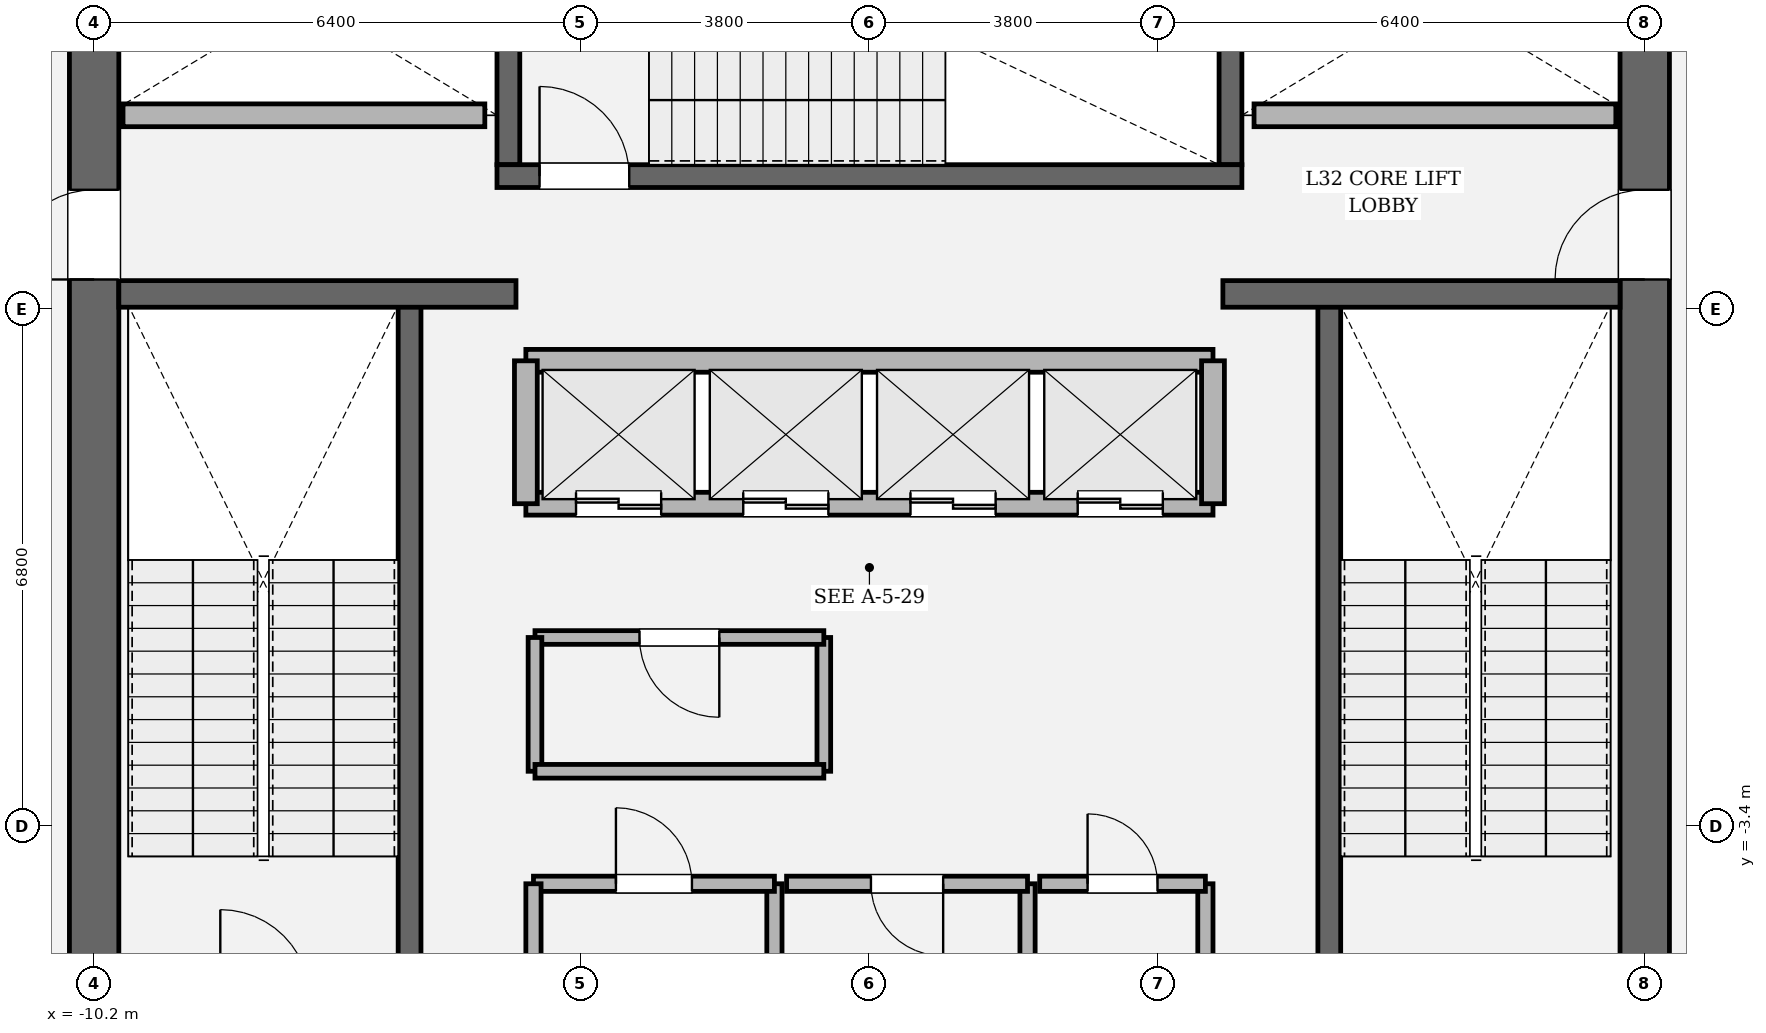
"""IFC4 building model, lengths in metres.
Left out: names, types, materials, properties, quantities, classifications, styles, units other than length and angle.
Written with IfcOpenShell. Run it as: python <this file> out.ifc"""

import sys

from ifc_helpers import new_model, si_unit, direction, frame, frame_2d, origin, place, context, subcontext, project, spatial, rectangle, extrude, element, fill, save


model = new_model("IFC4")
c1 = context("Model", 3, precision=1e-05, world=origin(), true_north=direction((0.0, 1.0)))
c2 = subcontext(c1, "Body", "Model", "MODEL_VIEW")
j1 = project(units=[si_unit("LENGTHUNIT", "METRE"), si_unit("PLANEANGLEUNIT", "RADIAN")], contexts=[c1])
p1 = place(None, origin())
s1 = spatial("IfcSite", under=j1, at=p1, CompositionType="ELEMENT")
p2 = place(p1, origin())
s2 = spatial("IfcBuilding", under=s1, at=p2, CompositionType="ELEMENT")
p3 = place(p2, frame((0.0, 0.0, 139.8)))
s3 = spatial("IfcBuildingStorey", under=s2, at=p3, CompositionType="ELEMENT", Elevation=139.8)
p4 = place(p3, frame((-10.2, -8.875, 0.0), z_axis=(0.0, 0.0, 1.0), x_axis=(0.0, 1.0, 0.0)))
e1 = element("IfcWall", 1, at=p4, inside=s3, PredefinedType="SHEAR", context=c2, shape_type="SweptSolid", body=[
    extrude(rectangle(XDim=17.75, YDim=0.65, at=frame_2d((8.875, 0.0))), origin(), (0.0, 0.0, 1.0), 4.05),
])
p5 = place(p4, frame((12.665, 0.0, 0.0)))
e2 = element("IfcOpeningElement", 2, at=p5, cuts=e1, PredefinedType="OPENING", context=c2, shape_type="SweptSolid", body=[
    extrude(rectangle(XDim=1.18, YDim=2.2, at=frame_2d((0.59, 1.1))), frame((0.0, 0.335, 0.0), z_axis=(0.0, -1.0, 0.0), x_axis=(1.0, 0.0, 0.0)), (0.0, 0.0, 1.0), 0.67),
])
p6 = place(p3, frame((10.2, 8.875, 0.0), z_axis=(0.0, 0.0, 1.0), x_axis=(0.0, -1.0, 0.0)))
e3 = element("IfcWall", 3, at=p6, inside=s3, PredefinedType="SHEAR", context=c2, shape_type="SweptSolid", body=[
    extrude(rectangle(XDim=17.75, YDim=0.65, at=frame_2d((8.875, 0.0))), origin(), (0.0, 0.0, 1.0), 4.05),
])
p7 = place(p6, frame((3.905, 0.0, 0.0)))
e4 = element("IfcOpeningElement", 4, at=p7, cuts=e3, PredefinedType="OPENING", context=c2, shape_type="SweptSolid", body=[
    extrude(rectangle(XDim=1.18, YDim=2.2, at=frame_2d((0.59, 1.1))), frame((0.0, 0.335, 0.0), z_axis=(0.0, -1.0, 0.0), x_axis=(1.0, 0.0, 0.0)), (0.0, 0.0, 1.0), 0.67),
])
for number, where, z_axis, x_axis in (
    (5, (-6.05, -5.5, 0.0), (0.0, 0.0, 1.0), (0.0, 1.0, 0.0)),
    (6, (6.05, 3.45, 0.0), (0.0, 0.0, 1.0), (0.0, -1.0, 0.0)),
):
    element("IfcWall", number, at=place(p3, frame(where, z_axis=z_axis, x_axis=x_axis)), inside=s3, PredefinedType="SOLIDWALL", context=c2, shape_type="SweptSolid", body=[
        extrude(rectangle(XDim=8.95, YDim=0.3, at=frame_2d((4.475, 0.0))), origin(), (0.0, 0.0, 1.0), 4.05),
    ])
for number, where, z_axis, x_axis in (
    (7, (-4.75, 5.3, 0.0), (0.0, 0.0, 1.0), (0.0, 1.0, 0.0)),
    (8, (4.75, 8.875, 0.0), (0.0, 0.0, 1.0), (0.0, -1.0, 0.0)),
):
    element("IfcWall", number, at=place(p3, frame(where, z_axis=z_axis, x_axis=x_axis)), inside=s3, PredefinedType="SOLIDWALL", context=c2, shape_type="SweptSolid", body=[
        extrude(rectangle(XDim=3.575, YDim=0.3, at=frame_2d((1.788, 0.0))), origin(), (0.0, 0.0, 1.0), 4.05),
    ])
p8 = place(p3, frame((-4.9, 5.15, 0.0), z_axis=(0.0, 0.0, 1.0), x_axis=(1.0, 0.0, 0.0)))
e9 = element("IfcWall", 9, at=p8, inside=s3, PredefinedType="SOLIDWALL", context=c2, shape_type="SweptSolid", body=[
    extrude(rectangle(XDim=9.8, YDim=0.3, at=frame_2d((4.9, 0.0))), origin(), (0.0, 0.0, 1.0), 4.05),
])
p9 = place(p8, frame((0.56, 0.0, 0.0)))
e10 = element("IfcOpeningElement", 10, at=p9, cuts=e9, PredefinedType="OPENING", context=c2, shape_type="SweptSolid", body=[
    extrude(rectangle(XDim=1.18, YDim=2.2, at=frame_2d((0.59, 1.1))), frame((0.0, 0.16, 0.0), z_axis=(0.0, -1.0, 0.0), x_axis=(1.0, 0.0, 0.0)), (0.0, 0.0, 1.0), 0.32),
])
for number, where, z_axis, x_axis in (
    (11, (-9.875, 3.6, 0.0), (0.0, 0.0, 1.0), (1.0, 0.0, 0.0)),
    (12, (4.65, 3.6, 0.0), (0.0, 0.0, 1.0), (1.0, 0.0, 0.0)),
):
    element("IfcWall", number, at=place(p3, frame(where, z_axis=z_axis, x_axis=x_axis)), inside=s3, PredefinedType="SOLIDWALL", context=c2, shape_type="SweptSolid", body=[
        extrude(rectangle(XDim=5.225, YDim=0.35, at=frame_2d((2.613, 0.0))), origin(), (0.0, 0.0, 1.0), 4.05),
    ])
p10 = place(p3, frame((-4.52, 0.84, 0.0), z_axis=(0.0, 0.0, 1.0), x_axis=(1.0, 0.0, 0.0)))
e13 = element("IfcWall", 13, at=p10, inside=s3, PredefinedType="SOLIDWALL", context=c2, shape_type="SweptSolid", body=[
    extrude(rectangle(XDim=9.04, YDim=0.3, at=frame_2d((4.52, 0.0))), origin(), (0.0, 0.0, 1.0), 3.83),
])
p11 = place(p10, frame((0.66, 0.0, 0.0)))
e14 = element("IfcOpeningElement", 14, at=p11, cuts=e13, PredefinedType="OPENING", context=c2, shape_type="SweptSolid", body=[
    extrude(rectangle(XDim=1.12, YDim=2.25, at=frame_2d((0.56, 1.125))), frame((0.0, 0.16, 0.0), z_axis=(0.0, -1.0, 0.0), x_axis=(1.0, 0.0, 0.0)), (0.0, 0.0, 1.0), 0.32),
])
p12 = place(p10, frame((2.86, 0.0, 0.0)))
e15 = element("IfcOpeningElement", 15, at=p12, cuts=e13, PredefinedType="OPENING", context=c2, shape_type="SweptSolid", body=[
    extrude(rectangle(XDim=1.12, YDim=2.25, at=frame_2d((0.56, 1.125))), frame((0.0, 0.16, 0.0), z_axis=(0.0, -1.0, 0.0), x_axis=(1.0, 0.0, 0.0)), (0.0, 0.0, 1.0), 0.32),
])
p13 = place(p10, frame((5.06, 0.0, 0.0)))
e16 = element("IfcOpeningElement", 16, at=p13, cuts=e13, PredefinedType="OPENING", context=c2, shape_type="SweptSolid", body=[
    extrude(rectangle(XDim=1.12, YDim=2.25, at=frame_2d((0.56, 1.125))), frame((0.0, 0.16, 0.0), z_axis=(0.0, -1.0, 0.0), x_axis=(1.0, 0.0, 0.0)), (0.0, 0.0, 1.0), 0.32),
])
p14 = place(p10, frame((7.26, 0.0, 0.0)))
e17 = element("IfcOpeningElement", 17, at=p14, cuts=e13, PredefinedType="OPENING", context=c2, shape_type="SweptSolid", body=[
    extrude(rectangle(XDim=1.12, YDim=2.25, at=frame_2d((0.56, 1.125))), frame((0.0, 0.16, 0.0), z_axis=(0.0, -1.0, 0.0), x_axis=(1.0, 0.0, 0.0)), (0.0, 0.0, 1.0), 0.32),
])
p15 = place(p3, frame((-4.52, 2.72, 0.0), z_axis=(0.0, 0.0, 1.0), x_axis=(1.0, 0.0, 0.0)))
e18 = element("IfcWall", 18, at=p15, inside=s3, PredefinedType="SOLIDWALL", context=c2, shape_type="SweptSolid", body=[
    extrude(rectangle(XDim=9.04, YDim=0.3, at=frame_2d((4.52, 0.0))), origin(), (0.0, 0.0, 1.0), 3.83),
])
for number, where, z_axis, x_axis in (
    (19, (-4.52, 0.84, 0.0), (0.0, 0.0, 1.0), (0.0, 1.0, 0.0)),
    (20, (4.52, 0.84, 0.0), (0.0, 0.0, 1.0), (0.0, 1.0, 0.0)),
):
    element("IfcWall", number, at=place(p3, frame(where, z_axis=z_axis, x_axis=x_axis)), inside=s3, PredefinedType="SOLIDWALL", context=c2, shape_type="SweptSolid", body=[
        extrude(rectangle(XDim=1.88, YDim=0.3, at=frame_2d((0.94, 0.0))), origin(), (0.0, 0.0, 1.0), 3.83),
    ])
for number, where, z_axis, x_axis in (
    (21, (-9.82, 5.95, 0.0), (0.0, 0.0, 1.0), (1.0, 0.0, 0.0)),
    (22, (5.06, 5.95, 0.0), (0.0, 0.0, 1.0), (1.0, 0.0, 0.0)),
):
    element("IfcWall", number, at=place(p3, frame(where, z_axis=z_axis, x_axis=x_axis)), inside=s3, PredefinedType="SOLIDWALL", context=c2, shape_type="SweptSolid", body=[
        extrude(rectangle(XDim=4.76, YDim=0.3, at=frame_2d((2.38, 0.0))), origin(), (0.0, 0.0, 1.0), 3.83),
    ])
p16 = place(p3, frame((-1.25, -5.9, 0.0), z_axis=(0.0, 0.0, 1.0), x_axis=(0.0, 1.0, 0.0)))
e23 = element("IfcWall", 23, at=p16, inside=s3, PredefinedType="SOLIDWALL", context=c2, shape_type="SweptSolid", body=[
    extrude(rectangle(XDim=1.74, YDim=0.2, at=frame_2d((0.87, 0.0))), origin(), (0.0, 0.0, 1.0), 3.83),
])
p17 = place(p3, frame((-1.25, -4.16, 0.0), z_axis=(0.0, 0.0, 1.0), x_axis=(-1.0, 0.0, 0.0)))
e24 = element("IfcWall", 24, at=p17, inside=s3, PredefinedType="SOLIDWALL", context=c2, shape_type="SweptSolid", body=[
    extrude(rectangle(XDim=3.17, YDim=0.2, at=frame_2d((1.585, 0.0))), origin(), (0.0, 0.0, 1.0), 3.83),
])
p18 = place(p17, frame((1.085, 0.0, 0.0)))
e25 = element("IfcOpeningElement", 25, at=p18, cuts=e24, PredefinedType="OPENING", context=c2, shape_type="SweptSolid", body=[
    extrude(rectangle(XDim=1.0, YDim=2.15, at=frame_2d((0.5, 1.075))), frame((0.0, 0.11, 0.0), z_axis=(0.0, -1.0, 0.0), x_axis=(1.0, 0.0, 0.0)), (0.0, 0.0, 1.0), 0.22),
])
for number, where, z_axis, x_axis in (
    (26, (-4.42, -4.16, 0.0), (0.0, 0.0, 1.0), (0.0, -1.0, 0.0)),
    (27, (2.08, -5.9, 0.0), (0.0, 0.0, 1.0), (0.0, 1.0, 0.0)),
):
    element("IfcWall", number, at=place(p3, frame(where, z_axis=z_axis, x_axis=x_axis)), inside=s3, PredefinedType="SOLIDWALL", context=c2, shape_type="SweptSolid", body=[
        extrude(rectangle(XDim=1.74, YDim=0.2, at=frame_2d((0.87, 0.0))), origin(), (0.0, 0.0, 1.0), 3.83),
    ])
p19 = place(p3, frame((2.08, -4.16, 0.0), z_axis=(0.0, 0.0, 1.0), x_axis=(-1.0, 0.0, 0.0)))
e28 = element("IfcWall", 28, at=p19, inside=s3, PredefinedType="SOLIDWALL", context=c2, shape_type="SweptSolid", body=[
    extrude(rectangle(XDim=3.17, YDim=0.2, at=frame_2d((1.585, 0.0))), origin(), (0.0, 0.0, 1.0), 3.83),
])
p20 = place(p19, frame((1.11, 0.0, 0.0)))
e29 = element("IfcOpeningElement", 29, at=p20, cuts=e28, PredefinedType="OPENING", context=c2, shape_type="SweptSolid", body=[
    extrude(rectangle(XDim=0.95, YDim=2.15, at=frame_2d((0.475, 1.075))), frame((0.0, 0.11, 0.0), z_axis=(0.0, -1.0, 0.0), x_axis=(1.0, 0.0, 0.0)), (0.0, 0.0, 1.0), 0.22),
])
p21 = place(p3, frame((4.42, -5.9, 0.0), z_axis=(0.0, 0.0, 1.0), x_axis=(0.0, 1.0, 0.0)))
e30 = element("IfcWall", 30, at=p21, inside=s3, PredefinedType="SOLIDWALL", context=c2, shape_type="SweptSolid", body=[
    extrude(rectangle(XDim=1.74, YDim=0.2, at=frame_2d((0.87, 0.0))), origin(), (0.0, 0.0, 1.0), 3.83),
])
p22 = place(p3, frame((4.42, -4.16, 0.0), z_axis=(0.0, 0.0, 1.0), x_axis=(-1.0, 0.0, 0.0)))
e31 = element("IfcWall", 31, at=p22, inside=s3, PredefinedType="SOLIDWALL", context=c2, shape_type="SweptSolid", body=[
    extrude(rectangle(XDim=2.18, YDim=0.2, at=frame_2d((1.09, 0.0))), origin(), (0.0, 0.0, 1.0), 3.83),
])
p23 = place(p22, frame((0.63, 0.0, 0.0)))
e32 = element("IfcOpeningElement", 32, at=p23, cuts=e31, PredefinedType="OPENING", context=c2, shape_type="SweptSolid", body=[
    extrude(rectangle(XDim=0.92, YDim=2.1, at=frame_2d((0.46, 1.05))), frame((0.0, 0.11, 0.0), z_axis=(0.0, -1.0, 0.0), x_axis=(1.0, 0.0, 0.0)), (0.0, 0.0, 1.0), 0.22),
])
p24 = place(p3, frame((-0.6, -2.68, 0.0), z_axis=(0.0, 0.0, 1.0), x_axis=(0.0, 1.0, 0.0)))
e33 = element("IfcWall", 33, at=p24, inside=s3, PredefinedType="PARTITIONING", context=c2, shape_type="SweptSolid", body=[
    extrude(rectangle(XDim=1.76, YDim=0.18, at=frame_2d((0.88, 0.0))), origin(), (0.0, 0.0, 1.0), 3.83),
])
p25 = place(p3, frame((-0.6, -0.92, 0.0), z_axis=(0.0, 0.0, 1.0), x_axis=(-1.0, 0.0, 0.0)))
e34 = element("IfcWall", 34, at=p25, inside=s3, PredefinedType="PARTITIONING", context=c2, shape_type="SweptSolid", body=[
    extrude(rectangle(XDim=3.8, YDim=0.18, at=frame_2d((1.9, 0.0))), origin(), (0.0, 0.0, 1.0), 3.83),
])
p26 = place(p25, frame((1.375, 0.0, 0.0)))
e35 = element("IfcOpeningElement", 35, at=p26, cuts=e34, PredefinedType="OPENING", context=c2, shape_type="SweptSolid", body=[
    extrude(rectangle(XDim=1.05, YDim=2.2, at=frame_2d((0.525, 1.1))), frame((0.0, 0.1, 0.0), z_axis=(0.0, -1.0, 0.0), x_axis=(1.0, 0.0, 0.0)), (0.0, 0.0, 1.0), 0.2),
])
p27 = place(p3, frame((-4.4, -0.92, 0.0), z_axis=(0.0, 0.0, 1.0), x_axis=(0.0, -1.0, 0.0)))
e36 = element("IfcWall", 36, at=p27, inside=s3, PredefinedType="PARTITIONING", context=c2, shape_type="SweptSolid", body=[
    extrude(rectangle(XDim=1.76, YDim=0.18, at=frame_2d((0.88, 0.0))), origin(), (0.0, 0.0, 1.0), 3.83),
])
p28 = place(p3, frame((-4.4, -2.68, 0.0), z_axis=(0.0, 0.0, 1.0), x_axis=(1.0, 0.0, 0.0)))
e37 = element("IfcWall", 37, at=p28, inside=s3, PredefinedType="PARTITIONING", context=c2, shape_type="SweptSolid", body=[
    extrude(rectangle(XDim=3.8, YDim=0.18, at=frame_2d((1.9, 0.0))), origin(), (0.0, 0.0, 1.0), 3.83),
])
p29 = place(p9, origin())
e38 = element("IfcDoor", 38, at=p29, inside=s3, OperationType="SINGLE_SWING_LEFT", PredefinedType="DOOR", context=c2, shape_type="SweptSolid", body=[
    extrude(rectangle(XDim=1.18, YDim=2.2, at=frame_2d((0.59, 1.1))), frame((0.0, 0.025, 0.0), z_axis=(0.0, -1.0, 0.0), x_axis=(1.0, 0.0, 0.0)), (0.0, 0.0, 1.0), 0.05),
])
fill(e10, e38)
p30 = place(p5, origin())
e39 = element("IfcDoor", 39, at=p30, inside=s3, OperationType="SINGLE_SWING_LEFT", PredefinedType="DOOR", context=c2, shape_type="SweptSolid", body=[
    extrude(rectangle(XDim=1.18, YDim=2.2, at=frame_2d((0.59, 1.1))), frame((0.0, 0.025, 0.0), z_axis=(0.0, -1.0, 0.0), x_axis=(1.0, 0.0, 0.0)), (0.0, 0.0, 1.0), 0.05),
])
fill(e2, e39)
p31 = place(p7, origin())
e40 = element("IfcDoor", 40, at=p31, inside=s3, OperationType="SINGLE_SWING_RIGHT", PredefinedType="DOOR", context=c2, shape_type="SweptSolid", body=[
    extrude(rectangle(XDim=1.18, YDim=2.2, at=frame_2d((0.59, 1.1))), frame((0.0, 0.025, 0.0), z_axis=(0.0, -1.0, 0.0), x_axis=(1.0, 0.0, 0.0)), (0.0, 0.0, 1.0), 0.05),
])
fill(e4, e40)
p32 = place(p11, origin())
e41 = element("IfcDoor", 41, at=p32, inside=s3, OperationType="DOUBLE_DOOR_SLIDING", PredefinedType="DOOR", context=c2, shape_type="SweptSolid", body=[
    extrude(rectangle(XDim=1.12, YDim=2.25, at=frame_2d((0.56, 1.125))), frame((0.0, 0.025, 0.0), z_axis=(0.0, -1.0, 0.0), x_axis=(1.0, 0.0, 0.0)), (0.0, 0.0, 1.0), 0.05),
])
fill(e14, e41)
p33 = place(p12, origin())
e42 = element("IfcDoor", 42, at=p33, inside=s3, OperationType="DOUBLE_DOOR_SLIDING", PredefinedType="DOOR", context=c2, shape_type="SweptSolid", body=[
    extrude(rectangle(XDim=1.12, YDim=2.25, at=frame_2d((0.56, 1.125))), frame((0.0, 0.025, 0.0), z_axis=(0.0, -1.0, 0.0), x_axis=(1.0, 0.0, 0.0)), (0.0, 0.0, 1.0), 0.05),
])
fill(e15, e42)
p34 = place(p13, origin())
e43 = element("IfcDoor", 43, at=p34, inside=s3, OperationType="DOUBLE_DOOR_SLIDING", PredefinedType="DOOR", context=c2, shape_type="SweptSolid", body=[
    extrude(rectangle(XDim=1.12, YDim=2.25, at=frame_2d((0.56, 1.125))), frame((0.0, 0.025, 0.0), z_axis=(0.0, -1.0, 0.0), x_axis=(1.0, 0.0, 0.0)), (0.0, 0.0, 1.0), 0.05),
])
fill(e16, e43)
p35 = place(p14, origin())
e44 = element("IfcDoor", 44, at=p35, inside=s3, OperationType="DOUBLE_DOOR_SLIDING", PredefinedType="DOOR", context=c2, shape_type="SweptSolid", body=[
    extrude(rectangle(XDim=1.12, YDim=2.25, at=frame_2d((0.56, 1.125))), frame((0.0, 0.025, 0.0), z_axis=(0.0, -1.0, 0.0), x_axis=(1.0, 0.0, 0.0)), (0.0, 0.0, 1.0), 0.05),
])
fill(e17, e44)
p36 = place(p18, origin())
e45 = element("IfcDoor", 45, at=p36, inside=s3, OperationType="SINGLE_SWING_RIGHT", PredefinedType="DOOR", context=c2, shape_type="SweptSolid", body=[
    extrude(rectangle(XDim=1.0, YDim=2.15, at=frame_2d((0.5, 1.075))), frame((0.0, 0.025, 0.0), z_axis=(0.0, -1.0, 0.0), x_axis=(1.0, 0.0, 0.0)), (0.0, 0.0, 1.0), 0.05),
])
fill(e25, e45)
p37 = place(p20, origin())
e46 = element("IfcDoor", 46, at=p37, inside=s3, OperationType="SINGLE_SWING_LEFT", PredefinedType="DOOR", context=c2, shape_type="SweptSolid", body=[
    extrude(rectangle(XDim=0.95, YDim=2.15, at=frame_2d((0.475, 1.075))), frame((0.0, 0.025, 0.0), z_axis=(0.0, -1.0, 0.0), x_axis=(1.0, 0.0, 0.0)), (0.0, 0.0, 1.0), 0.05),
])
fill(e29, e46)
p38 = place(p23, origin())
e47 = element("IfcDoor", 47, at=p38, inside=s3, OperationType="SINGLE_SWING_RIGHT", PredefinedType="DOOR", context=c2, shape_type="SweptSolid", body=[
    extrude(rectangle(XDim=0.92, YDim=2.1, at=frame_2d((0.46, 1.05))), frame((0.0, 0.025, 0.0), z_axis=(0.0, -1.0, 0.0), x_axis=(1.0, 0.0, 0.0)), (0.0, 0.0, 1.0), 0.05),
])
fill(e32, e47)
p39 = place(p26, origin())
e48 = element("IfcDoor", 48, at=p39, inside=s3, OperationType="SINGLE_SWING_LEFT", PredefinedType="DOOR", context=c2, shape_type="SweptSolid", body=[
    extrude(rectangle(XDim=1.05, YDim=2.2, at=frame_2d((0.525, 1.1))), frame((0.0, 0.025, 0.0), z_axis=(0.0, -1.0, 0.0), x_axis=(1.0, 0.0, 0.0)), (0.0, 0.0, 1.0), 0.05),
])
fill(e35, e48)
save(model, sys.argv[1])
